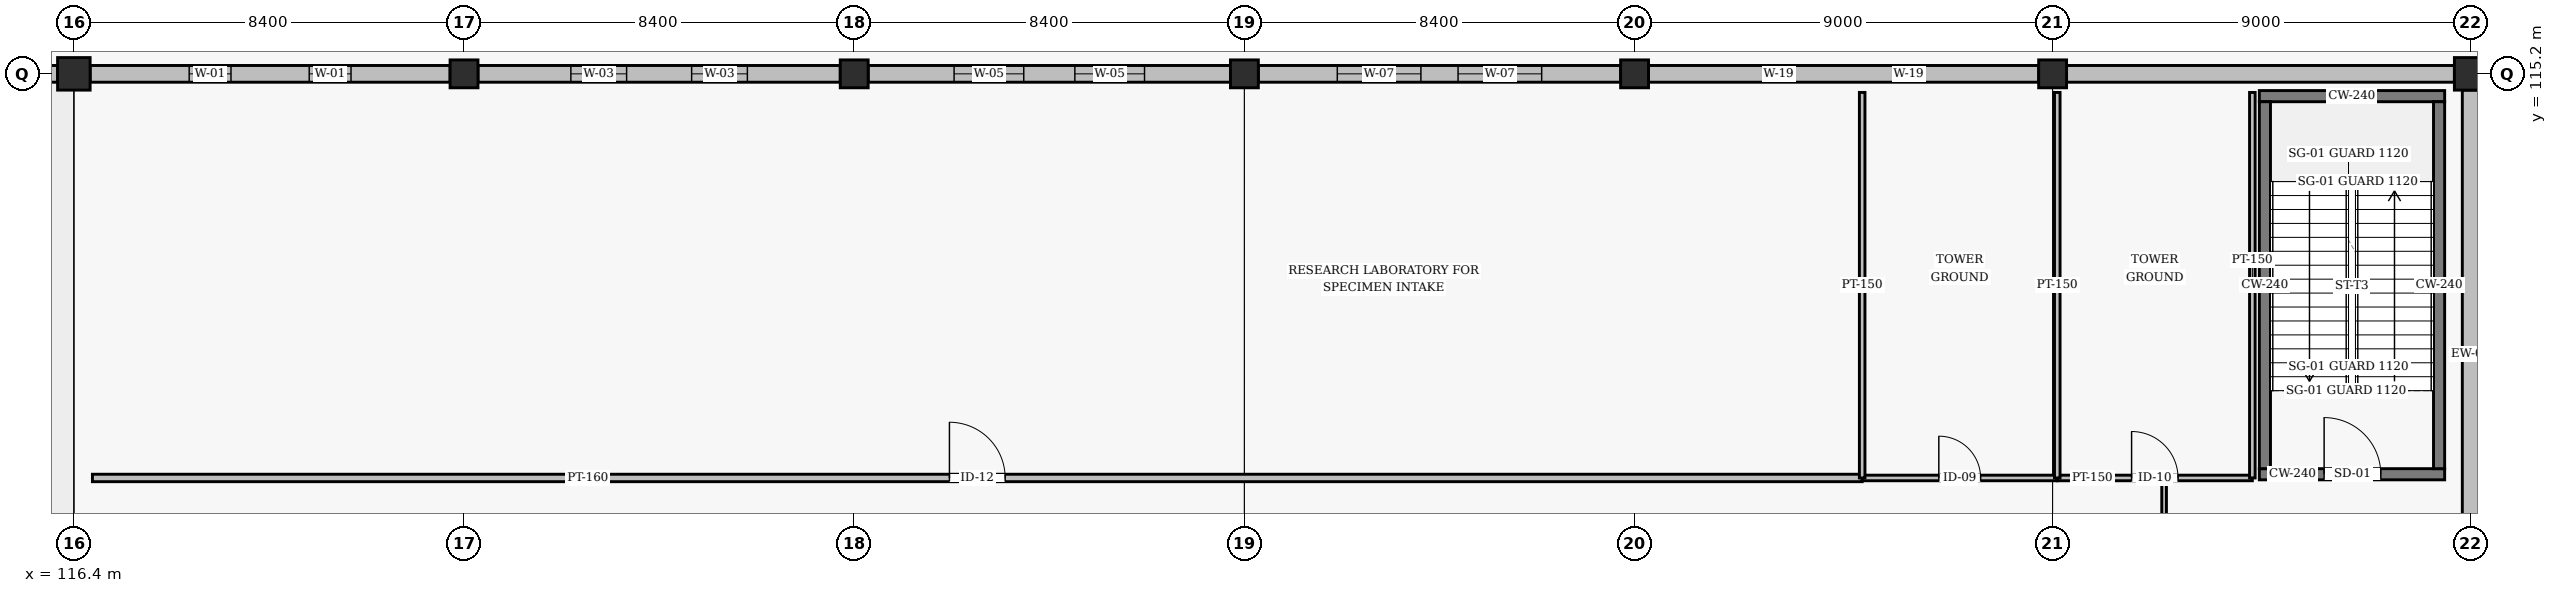
"""IFC4 building model, lengths in metres.
Left out: names, types, materials, properties, quantities, classifications, styles, units other than length and angle.
Written with IfcOpenShell. Run it as: python <this file> out.ifc"""

import sys

from ifc_helpers import new_model, si_unit, direction, frame, frame_2d, origin, origin_2d, place, context, subcontext, project, spatial, rectangle, hollow_rectangle, extrude, element, fill, save


model = new_model("IFC4")
c1 = context("Model", 3, precision=1e-05, world=origin(), true_north=direction((0.0, 1.0)))
c2 = subcontext(c1, "Body", "Model", "MODEL_VIEW")
j1 = project(units=[si_unit("LENGTHUNIT", "METRE"), si_unit("PLANEANGLEUNIT", "RADIAN")], contexts=[c1])
p1 = place(None, origin())
s1 = spatial("IfcSite", under=j1, at=p1, CompositionType="ELEMENT")
p2 = place(p1, origin())
s2 = spatial("IfcBuilding", under=s1, at=p2, CompositionType="ELEMENT")
p3 = place(p2, origin())
s3 = spatial("IfcBuildingStorey", under=s2, at=p3, CompositionType="ELEMENT", Elevation=0.0)
p4 = place(p3, frame((116.4, 115.2, 0.0), z_axis=(0.0, 0.0, 1.0), x_axis=(1.0, 0.0, 0.0)))
e1 = element("IfcColumn", 1, at=p4, inside=s3, PredefinedType="COLUMN", context=c2, shape_type="SweptSolid", body=[
    extrude(hollow_rectangle(XDim=0.7, YDim=0.7, WallThickness=0.032, InnerFilletRadius=0.032, OuterFilletRadius=0.064, at=origin_2d()), origin(), (0.0, 0.0, 1.0), 4.8),
])
for number, where, z_axis, x_axis in (
    (2, (124.8, 115.2, 0.0), (0.0, 0.0, 1.0), (1.0, 0.0, 0.0)),
    (3, (133.2, 115.2, 0.0), (0.0, 0.0, 1.0), (1.0, 0.0, 0.0)),
    (4, (141.6, 115.2, 0.0), (0.0, 0.0, 1.0), (1.0, 0.0, 0.0)),
    (5, (150.0, 115.2, 0.0), (0.0, 0.0, 1.0), (1.0, 0.0, 0.0)),
    (6, (159.0, 115.2, 0.0), (0.0, 0.0, 1.0), (1.0, 0.0, 0.0)),
):
    element("IfcColumn", number, at=place(p3, frame(where, z_axis=z_axis, x_axis=x_axis)), inside=s3, PredefinedType="COLUMN", context=c2, shape_type="SweptSolid", body=[
        extrude(hollow_rectangle(XDim=0.6, YDim=0.6, WallThickness=0.025, InnerFilletRadius=0.025, OuterFilletRadius=0.05, at=origin_2d()), origin(), (0.0, 0.0, 1.0), 4.8),
    ])
p5 = place(p3, frame((168.0, 115.2, 0.0), z_axis=(0.0, 0.0, 1.0), x_axis=(1.0, 0.0, 0.0)))
e7 = element("IfcColumn", 7, at=p5, inside=s3, PredefinedType="COLUMN", context=c2, shape_type="SweptSolid", body=[
    extrude(hollow_rectangle(XDim=0.7, YDim=0.7, WallThickness=0.032, InnerFilletRadius=0.032, OuterFilletRadius=0.064, at=origin_2d()), origin(), (0.0, 0.0, 1.0), 4.8),
])
p6 = place(p3, frame((168.0, 103.5, 0.0), z_axis=(0.0, 0.0, 1.0), x_axis=(0.0, 1.0, 0.0)))
e8 = element("IfcWall", 8, at=p6, inside=s3, PredefinedType="SOLIDWALL", context=c2, shape_type="SweptSolid", body=[
    extrude(rectangle(XDim=11.35, YDim=0.36, at=frame_2d((5.675, 0.0))), origin(), (0.0, 0.0, 1.0), 3.768),
])
p7 = place(p6, frame((0.7, 0.0, 0.0)))
e9 = element("IfcOpeningElement", 9, at=p7, cuts=e8, PredefinedType="OPENING", context=c2, shape_type="SweptSolid", body=[
    extrude(rectangle(XDim=1.2, YDim=2.2, at=frame_2d((0.6, 1.1))), frame((0.0, 0.19, 0.0), z_axis=(0.0, -1.0, 0.0), x_axis=(1.0, 0.0, 0.0)), (0.0, 0.0, 1.0), 0.38),
])
p8 = place(p3, frame((167.65, 115.2, 0.0), z_axis=(0.0, 0.0, 1.0), x_axis=(-1.0, 0.0, 0.0)))
e10 = element("IfcWall", 10, at=p8, inside=s3, PredefinedType="SOLIDWALL", context=c2, shape_type="SweptSolid", body=[
    extrude(rectangle(XDim=8.35, YDim=0.36, at=frame_2d((4.175, 0.0))), origin(), (0.0, 0.0, 1.0), 3.768),
])
p9 = place(p3, frame((158.7, 115.2, 0.0), z_axis=(0.0, 0.0, 1.0), x_axis=(-1.0, 0.0, 0.0)))
e11 = element("IfcWall", 11, at=p9, inside=s3, PredefinedType="SOLIDWALL", context=c2, shape_type="SweptSolid", body=[
    extrude(rectangle(XDim=8.4, YDim=0.36, at=frame_2d((4.2, 0.0))), origin(), (0.0, 0.0, 1.0), 3.768),
])
p10 = place(p9, frame((2.475, 0.0, 1.35)))
e12 = element("IfcOpeningElement", 12, at=p10, cuts=e11, PredefinedType="OPENING", context=c2, shape_type="SweptSolid", body=[
    extrude(rectangle(XDim=0.65, YDim=1.2, at=frame_2d((0.325, 0.6))), frame((0.0, 0.19, 0.0), z_axis=(0.0, -1.0, 0.0), x_axis=(1.0, 0.0, 0.0)), (0.0, 0.0, 1.0), 0.38),
])
p11 = place(p9, frame((5.275, 0.0, 1.35)))
e13 = element("IfcOpeningElement", 13, at=p11, cuts=e11, PredefinedType="OPENING", context=c2, shape_type="SweptSolid", body=[
    extrude(rectangle(XDim=0.65, YDim=1.2, at=frame_2d((0.325, 0.6))), frame((0.0, 0.19, 0.0), z_axis=(0.0, -1.0, 0.0), x_axis=(1.0, 0.0, 0.0)), (0.0, 0.0, 1.0), 0.38),
])
p12 = place(p3, frame((149.7, 115.2, 0.0), z_axis=(0.0, 0.0, 1.0), x_axis=(-1.0, 0.0, 0.0)))
e14 = element("IfcWall", 14, at=p12, inside=s3, PredefinedType="SOLIDWALL", context=c2, shape_type="SweptSolid", body=[
    extrude(rectangle(XDim=7.8, YDim=0.36, at=frame_2d((3.9, 0.0))), origin(), (0.0, 0.0, 1.0), 3.868),
])
p13 = place(p12, frame((1.7, 0.0, 0.85)))
e15 = element("IfcOpeningElement", 15, at=p13, cuts=e14, PredefinedType="OPENING", context=c2, shape_type="SweptSolid", body=[
    extrude(rectangle(XDim=1.8, YDim=2.1, at=frame_2d((0.9, 1.05))), frame((0.0, 0.19, 0.0), z_axis=(0.0, -1.0, 0.0), x_axis=(1.0, 0.0, 0.0)), (0.0, 0.0, 1.0), 0.38),
])
p14 = place(p12, frame((4.3, 0.0, 0.85)))
e16 = element("IfcOpeningElement", 16, at=p14, cuts=e14, PredefinedType="OPENING", context=c2, shape_type="SweptSolid", body=[
    extrude(rectangle(XDim=1.8, YDim=2.1, at=frame_2d((0.9, 1.05))), frame((0.0, 0.19, 0.0), z_axis=(0.0, -1.0, 0.0), x_axis=(1.0, 0.0, 0.0)), (0.0, 0.0, 1.0), 0.38),
])
p15 = place(p3, frame((141.3, 115.2, 0.0), z_axis=(0.0, 0.0, 1.0), x_axis=(-1.0, 0.0, 0.0)))
e17 = element("IfcWall", 17, at=p15, inside=s3, PredefinedType="SOLIDWALL", context=c2, shape_type="SweptSolid", body=[
    extrude(rectangle(XDim=7.8, YDim=0.36, at=frame_2d((3.9, 0.0))), origin(), (0.0, 0.0, 1.0), 3.868),
])
p16 = place(p15, frame((1.85, 0.0, 0.85)))
e18 = element("IfcOpeningElement", 18, at=p16, cuts=e17, PredefinedType="OPENING", context=c2, shape_type="SweptSolid", body=[
    extrude(rectangle(XDim=1.5, YDim=2.1, at=frame_2d((0.75, 1.05))), frame((0.0, 0.19, 0.0), z_axis=(0.0, -1.0, 0.0), x_axis=(1.0, 0.0, 0.0)), (0.0, 0.0, 1.0), 0.38),
])
p17 = place(p15, frame((4.45, 0.0, 0.85)))
e19 = element("IfcOpeningElement", 19, at=p17, cuts=e17, PredefinedType="OPENING", context=c2, shape_type="SweptSolid", body=[
    extrude(rectangle(XDim=1.5, YDim=2.1, at=frame_2d((0.75, 1.05))), frame((0.0, 0.19, 0.0), z_axis=(0.0, -1.0, 0.0), x_axis=(1.0, 0.0, 0.0)), (0.0, 0.0, 1.0), 0.38),
])
p18 = place(p3, frame((132.9, 115.2, 0.0), z_axis=(0.0, 0.0, 1.0), x_axis=(-1.0, 0.0, 0.0)))
e20 = element("IfcWall", 20, at=p18, inside=s3, PredefinedType="SOLIDWALL", context=c2, shape_type="SweptSolid", body=[
    extrude(rectangle(XDim=7.8, YDim=0.36, at=frame_2d((3.9, 0.0))), origin(), (0.0, 0.0, 1.0), 3.868),
])
p19 = place(p18, frame((2.0, 0.0, 0.85)))
e21 = element("IfcOpeningElement", 21, at=p19, cuts=e20, PredefinedType="OPENING", context=c2, shape_type="SweptSolid", body=[
    extrude(rectangle(XDim=1.2, YDim=2.1, at=frame_2d((0.6, 1.05))), frame((0.0, 0.19, 0.0), z_axis=(0.0, -1.0, 0.0), x_axis=(1.0, 0.0, 0.0)), (0.0, 0.0, 1.0), 0.38),
])
p20 = place(p18, frame((4.6, 0.0, 0.85)))
e22 = element("IfcOpeningElement", 22, at=p20, cuts=e20, PredefinedType="OPENING", context=c2, shape_type="SweptSolid", body=[
    extrude(rectangle(XDim=1.2, YDim=2.1, at=frame_2d((0.6, 1.05))), frame((0.0, 0.19, 0.0), z_axis=(0.0, -1.0, 0.0), x_axis=(1.0, 0.0, 0.0)), (0.0, 0.0, 1.0), 0.38),
])
p21 = place(p3, frame((124.5, 115.2, 0.0), z_axis=(0.0, 0.0, 1.0), x_axis=(-1.0, 0.0, 0.0)))
e23 = element("IfcWall", 23, at=p21, inside=s3, PredefinedType="SOLIDWALL", context=c2, shape_type="SweptSolid", body=[
    extrude(rectangle(XDim=7.75, YDim=0.36, at=frame_2d((3.875, 0.0))), origin(), (0.0, 0.0, 1.0), 3.868),
])
p22 = place(p21, frame((2.133, 0.0, 0.95)))
e24 = element("IfcOpeningElement", 24, at=p22, cuts=e23, PredefinedType="OPENING", context=c2, shape_type="SweptSolid", body=[
    extrude(rectangle(XDim=0.9, YDim=1.8, at=frame_2d((0.45, 0.9))), frame((0.0, 0.19, 0.0), z_axis=(0.0, -1.0, 0.0), x_axis=(1.0, 0.0, 0.0)), (0.0, 0.0, 1.0), 0.38),
])
p23 = place(p21, frame((4.717, 0.0, 0.95)))
e25 = element("IfcOpeningElement", 25, at=p23, cuts=e23, PredefinedType="OPENING", context=c2, shape_type="SweptSolid", body=[
    extrude(rectangle(XDim=0.9, YDim=1.8, at=frame_2d((0.45, 0.9))), frame((0.0, 0.19, 0.0), z_axis=(0.0, -1.0, 0.0), x_axis=(1.0, 0.0, 0.0)), (0.0, 0.0, 1.0), 0.38),
])
p24 = place(p3, frame((116.05, 115.2, 0.0), z_axis=(0.0, 0.0, 1.0), x_axis=(-1.0, 0.0, 0.0)))
e26 = element("IfcWall", 26, at=p24, inside=s3, PredefinedType="SOLIDWALL", context=c2, shape_type="SweptSolid", body=[
    extrude(rectangle(XDim=7.9, YDim=0.36, at=frame_2d((3.95, 0.0))), origin(), (0.0, 0.0, 1.0), 4.56),
])
p25 = place(p24, frame((0.85, 0.0, 0.0)))
e27 = element("IfcOpeningElement", 27, at=p25, cuts=e26, PredefinedType="OPENING", context=c2, shape_type="SweptSolid", body=[
    extrude(rectangle(XDim=6.0, YDim=3.2, at=frame_2d((3.0, 1.6))), frame((0.0, 0.19, 0.0), z_axis=(0.0, -1.0, 0.0), x_axis=(1.0, 0.0, 0.0)), (0.0, 0.0, 1.0), 0.38),
])
p26 = place(p3, frame((163.45, 106.58, 0.0), z_axis=(0.0, 0.0, 1.0), x_axis=(1.0, 0.0, 0.0)))
e28 = element("IfcWall", 28, at=p26, inside=s3, PredefinedType="SHEAR", context=c2, shape_type="SweptSolid", body=[
    extrude(rectangle(XDim=3.99, YDim=0.24, at=frame_2d((1.995, 0.0))), origin(), (0.0, 0.0, 1.0), 4.56),
])
p27 = place(p26, frame((1.395, 0.0, 0.0)))
e29 = element("IfcOpeningElement", 29, at=p27, cuts=e28, PredefinedType="OPENING", context=c2, shape_type="SweptSolid", body=[
    extrude(rectangle(XDim=1.22, YDim=2.18, at=frame_2d((0.61, 1.09))), frame((0.0, 0.13, 0.0), z_axis=(0.0, -1.0, 0.0), x_axis=(1.0, 0.0, 0.0)), (0.0, 0.0, 1.0), 0.26),
])
p28 = place(p3, frame((163.45, 114.72, 0.0), z_axis=(0.0, 0.0, 1.0), x_axis=(1.0, 0.0, 0.0)))
e30 = element("IfcWall", 30, at=p28, inside=s3, PredefinedType="SHEAR", context=c2, shape_type="SweptSolid", body=[
    extrude(rectangle(XDim=3.99, YDim=0.24, at=frame_2d((1.995, 0.0))), origin(), (0.0, 0.0, 1.0), 4.56),
])
for number, where, z_axis, x_axis in (
    (31, (163.57, 106.7, 0.0), (0.0, 0.0, 1.0), (0.0, 1.0, 0.0)),
    (32, (167.32, 106.7, 0.0), (0.0, 0.0, 1.0), (0.0, 1.0, 0.0)),
):
    element("IfcWall", number, at=place(p3, frame(where, z_axis=z_axis, x_axis=x_axis)), inside=s3, PredefinedType="SHEAR", context=c2, shape_type="SweptSolid", body=[
        extrude(rectangle(XDim=7.9, YDim=0.24, at=frame_2d((3.95, 0.0))), origin(), (0.0, 0.0, 1.0), 4.56),
    ])
p29 = place(p3, frame((161.4, 86.4, 0.0), z_axis=(0.0, 0.0, 1.0), x_axis=(0.0, 1.0, 0.0)))
e33 = element("IfcWall", 33, at=p29, inside=s3, PredefinedType="PARTITIONING", context=c2, shape_type="SweptSolid", body=[
    extrude(rectangle(XDim=20.0, YDim=0.1, at=frame_2d((10.0, 0.0))), origin(), (0.0, 0.0, 1.0), 3.91),
])
p30 = place(p29, frame((9.2, 0.0, 0.0)))
e34 = element("IfcOpeningElement", 34, at=p30, cuts=e33, PredefinedType="OPENING", context=c2, shape_type="SweptSolid", body=[
    extrude(rectangle(XDim=1.6, YDim=2.1, at=frame_2d((0.8, 1.05))), frame((0.0, 0.06, 0.0), z_axis=(0.0, -1.0, 0.0), x_axis=(1.0, 0.0, 0.0)), (0.0, 0.0, 1.0), 0.12),
])
p31 = place(p3, frame((116.8, 106.5, 0.0), z_axis=(0.0, 0.0, 1.0), x_axis=(1.0, 0.0, 0.0)))
e35 = element("IfcWall", 35, at=p31, inside=s3, PredefinedType="PARTITIONING", context=c2, shape_type="SweptSolid", body=[
    extrude(rectangle(XDim=38.1, YDim=0.16, at=frame_2d((19.05, 0.0))), origin(), (0.0, 0.0, 1.0), 3.81),
])
p32 = place(p31, frame((18.45, 0.0, 0.0)))
e36 = element("IfcOpeningElement", 36, at=p32, cuts=e35, PredefinedType="OPENING", context=c2, shape_type="SweptSolid", body=[
    extrude(rectangle(XDim=1.2, YDim=2.08, at=frame_2d((0.6, 1.04))), frame((0.0, 0.09, 0.0), z_axis=(0.0, -1.0, 0.0), x_axis=(1.0, 0.0, 0.0)), (0.0, 0.0, 1.0), 0.18),
])
p33 = place(p3, frame((154.9, 106.5, 0.0), z_axis=(0.0, 0.0, 1.0), x_axis=(1.0, 0.0, 0.0)))
e37 = element("IfcWall", 37, at=p33, inside=s3, PredefinedType="PARTITIONING", context=c2, shape_type="SweptSolid", body=[
    extrude(rectangle(XDim=4.2, YDim=0.12, at=frame_2d((2.1, 0.0))), origin(), (0.0, 0.0, 1.0), 3.81),
])
p34 = place(p33, frame((1.65, 0.0, 0.0)))
e38 = element("IfcOpeningElement", 38, at=p34, cuts=e37, PredefinedType="OPENING", context=c2, shape_type="SweptSolid", body=[
    extrude(rectangle(XDim=0.9, YDim=2.1, at=frame_2d((0.45, 1.05))), frame((0.0, 0.07, 0.0), z_axis=(0.0, -1.0, 0.0), x_axis=(1.0, 0.0, 0.0)), (0.0, 0.0, 1.0), 0.14),
])
p35 = place(p3, frame((159.1, 106.5, 0.0), z_axis=(0.0, 0.0, 1.0), x_axis=(1.0, 0.0, 0.0)))
e39 = element("IfcWall", 39, at=p35, inside=s3, PredefinedType="PARTITIONING", context=c2, shape_type="SweptSolid", body=[
    extrude(rectangle(XDim=4.2, YDim=0.12, at=frame_2d((2.1, 0.0))), origin(), (0.0, 0.0, 1.0), 4.56),
])
p36 = place(p35, frame((1.6, 0.0, 0.0)))
e40 = element("IfcOpeningElement", 40, at=p36, cuts=e39, PredefinedType="OPENING", context=c2, shape_type="SweptSolid", body=[
    extrude(rectangle(XDim=1.0, YDim=2.1, at=frame_2d((0.5, 1.05))), frame((0.0, 0.07, 0.0), z_axis=(0.0, -1.0, 0.0), x_axis=(1.0, 0.0, 0.0)), (0.0, 0.0, 1.0), 0.14),
])
p37 = place(p3, frame((154.9, 106.5, 0.0), z_axis=(0.0, 0.0, 1.0), x_axis=(0.0, 1.0, 0.0)))
e41 = element("IfcWall", 41, at=p37, inside=s3, PredefinedType="PARTITIONING", context=c2, shape_type="SweptSolid", body=[
    extrude(rectangle(XDim=8.3, YDim=0.12, at=frame_2d((4.15, 0.0))), origin(), (0.0, 0.0, 1.0), 4.16),
])
p38 = place(p3, frame((159.1, 106.5, 0.0), z_axis=(0.0, 0.0, 1.0), x_axis=(0.0, 1.0, 0.0)))
e42 = element("IfcWall", 42, at=p38, inside=s3, PredefinedType="PARTITIONING", context=c2, shape_type="SweptSolid", body=[
    extrude(rectangle(XDim=8.3, YDim=0.12, at=frame_2d((4.15, 0.0))), origin(), (0.0, 0.0, 1.0), 3.81),
])
p39 = place(p3, frame((163.3, 106.5, 0.0), z_axis=(0.0, 0.0, 1.0), x_axis=(0.0, 1.0, 0.0)))
e43 = element("IfcWall", 43, at=p39, inside=s3, PredefinedType="PARTITIONING", context=c2, shape_type="SweptSolid", body=[
    extrude(rectangle(XDim=8.3, YDim=0.12, at=frame_2d((4.15, 0.0))), origin(), (0.0, 0.0, 1.0), 4.56),
])
p40 = place(p10, origin())
e44 = element("IfcWindow", 44, at=p40, inside=s3, PartitioningType="SINGLE_PANEL", PredefinedType="WINDOW", context=c2, shape_type="SweptSolid", body=[
    extrude(rectangle(XDim=0.65, YDim=1.2, at=frame_2d((0.325, 0.6))), frame((0.0, 0.03, 0.0), z_axis=(0.0, -1.0, 0.0), x_axis=(1.0, 0.0, 0.0)), (0.0, 0.0, 1.0), 0.06),
])
fill(e12, e44)
p41 = place(p11, origin())
e45 = element("IfcWindow", 45, at=p41, inside=s3, PartitioningType="SINGLE_PANEL", PredefinedType="WINDOW", context=c2, shape_type="SweptSolid", body=[
    extrude(rectangle(XDim=0.65, YDim=1.2, at=frame_2d((0.325, 0.6))), frame((0.0, 0.03, 0.0), z_axis=(0.0, -1.0, 0.0), x_axis=(1.0, 0.0, 0.0)), (0.0, 0.0, 1.0), 0.06),
])
fill(e13, e45)
p42 = place(p13, origin())
e46 = element("IfcWindow", 46, at=p42, inside=s3, PartitioningType="SINGLE_PANEL", PredefinedType="WINDOW", context=c2, shape_type="SweptSolid", body=[
    extrude(rectangle(XDim=1.8, YDim=2.1, at=frame_2d((0.9, 1.05))), frame((0.0, 0.03, 0.0), z_axis=(0.0, -1.0, 0.0), x_axis=(1.0, 0.0, 0.0)), (0.0, 0.0, 1.0), 0.06),
])
fill(e15, e46)
p43 = place(p14, origin())
e47 = element("IfcWindow", 47, at=p43, inside=s3, PartitioningType="SINGLE_PANEL", PredefinedType="WINDOW", context=c2, shape_type="SweptSolid", body=[
    extrude(rectangle(XDim=1.8, YDim=2.1, at=frame_2d((0.9, 1.05))), frame((0.0, 0.03, 0.0), z_axis=(0.0, -1.0, 0.0), x_axis=(1.0, 0.0, 0.0)), (0.0, 0.0, 1.0), 0.06),
])
fill(e16, e47)
p44 = place(p16, origin())
e48 = element("IfcWindow", 48, at=p44, inside=s3, PartitioningType="SINGLE_PANEL", PredefinedType="WINDOW", context=c2, shape_type="SweptSolid", body=[
    extrude(rectangle(XDim=1.5, YDim=2.1, at=frame_2d((0.75, 1.05))), frame((0.0, 0.03, 0.0), z_axis=(0.0, -1.0, 0.0), x_axis=(1.0, 0.0, 0.0)), (0.0, 0.0, 1.0), 0.06),
])
fill(e18, e48)
p45 = place(p17, origin())
e49 = element("IfcWindow", 49, at=p45, inside=s3, PartitioningType="SINGLE_PANEL", PredefinedType="WINDOW", context=c2, shape_type="SweptSolid", body=[
    extrude(rectangle(XDim=1.5, YDim=2.1, at=frame_2d((0.75, 1.05))), frame((0.0, 0.03, 0.0), z_axis=(0.0, -1.0, 0.0), x_axis=(1.0, 0.0, 0.0)), (0.0, 0.0, 1.0), 0.06),
])
fill(e19, e49)
p46 = place(p19, origin())
e50 = element("IfcWindow", 50, at=p46, inside=s3, PartitioningType="SINGLE_PANEL", PredefinedType="WINDOW", context=c2, shape_type="SweptSolid", body=[
    extrude(rectangle(XDim=1.2, YDim=2.1, at=frame_2d((0.6, 1.05))), frame((0.0, 0.03, 0.0), z_axis=(0.0, -1.0, 0.0), x_axis=(1.0, 0.0, 0.0)), (0.0, 0.0, 1.0), 0.06),
])
fill(e21, e50)
p47 = place(p20, origin())
e51 = element("IfcWindow", 51, at=p47, inside=s3, PartitioningType="SINGLE_PANEL", PredefinedType="WINDOW", context=c2, shape_type="SweptSolid", body=[
    extrude(rectangle(XDim=1.2, YDim=2.1, at=frame_2d((0.6, 1.05))), frame((0.0, 0.03, 0.0), z_axis=(0.0, -1.0, 0.0), x_axis=(1.0, 0.0, 0.0)), (0.0, 0.0, 1.0), 0.06),
])
fill(e22, e51)
p48 = place(p22, origin())
e52 = element("IfcWindow", 52, at=p48, inside=s3, PartitioningType="SINGLE_PANEL", PredefinedType="WINDOW", context=c2, shape_type="SweptSolid", body=[
    extrude(rectangle(XDim=0.9, YDim=1.8, at=frame_2d((0.45, 0.9))), frame((0.0, 0.03, 0.0), z_axis=(0.0, -1.0, 0.0), x_axis=(1.0, 0.0, 0.0)), (0.0, 0.0, 1.0), 0.06),
])
fill(e24, e52)
p49 = place(p23, origin())
e53 = element("IfcWindow", 53, at=p49, inside=s3, PartitioningType="SINGLE_PANEL", PredefinedType="WINDOW", context=c2, shape_type="SweptSolid", body=[
    extrude(rectangle(XDim=0.9, YDim=1.8, at=frame_2d((0.45, 0.9))), frame((0.0, 0.03, 0.0), z_axis=(0.0, -1.0, 0.0), x_axis=(1.0, 0.0, 0.0)), (0.0, 0.0, 1.0), 0.06),
])
fill(e25, e53)
p50 = place(p27, origin())
e54 = element("IfcDoor", 54, at=p50, inside=s3, OperationType="SINGLE_SWING_LEFT", PredefinedType="DOOR", context=c2, shape_type="SweptSolid", body=[
    extrude(rectangle(XDim=1.22, YDim=2.18, at=frame_2d((0.61, 1.09))), frame((0.0, 0.025, 0.0), z_axis=(0.0, -1.0, 0.0), x_axis=(1.0, 0.0, 0.0)), (0.0, 0.0, 1.0), 0.05),
])
fill(e29, e54)
p51 = place(p32, origin())
e55 = element("IfcDoor", 55, at=p51, inside=s3, OperationType="SINGLE_SWING_LEFT", PredefinedType="DOOR", context=c2, shape_type="SweptSolid", body=[
    extrude(rectangle(XDim=1.2, YDim=2.08, at=frame_2d((0.6, 1.04))), frame((0.0, 0.025, 0.0), z_axis=(0.0, -1.0, 0.0), x_axis=(1.0, 0.0, 0.0)), (0.0, 0.0, 1.0), 0.05),
])
fill(e36, e55)
p52 = place(p34, origin())
e56 = element("IfcDoor", 56, at=p52, inside=s3, OperationType="SINGLE_SWING_LEFT", PredefinedType="DOOR", context=c2, shape_type="SweptSolid", body=[
    extrude(rectangle(XDim=0.9, YDim=2.1, at=frame_2d((0.45, 1.05))), frame((0.0, 0.025, 0.0), z_axis=(0.0, -1.0, 0.0), x_axis=(1.0, 0.0, 0.0)), (0.0, 0.0, 1.0), 0.05),
])
fill(e38, e56)
p53 = place(p36, origin())
e57 = element("IfcDoor", 57, at=p53, inside=s3, OperationType="SINGLE_SWING_LEFT", PredefinedType="DOOR", context=c2, shape_type="SweptSolid", body=[
    extrude(rectangle(XDim=1.0, YDim=2.1, at=frame_2d((0.5, 1.05))), frame((0.0, 0.025, 0.0), z_axis=(0.0, -1.0, 0.0), x_axis=(1.0, 0.0, 0.0)), (0.0, 0.0, 1.0), 0.05),
])
fill(e40, e57)
save(model, sys.argv[1])
